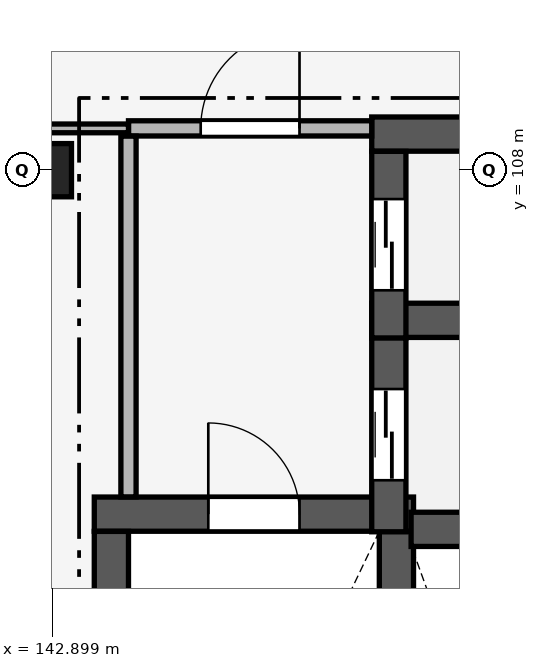
"""IFC4 building model, lengths in metres.
Left out: names, types, materials, properties, quantities, classifications, styles, units other than length and angle.
Written with IfcOpenShell. Run it as: python <this file> out.ifc"""

import sys

from ifc_helpers import new_model, si_unit, direction, frame, frame_2d, origin, origin_2d, place, context, subcontext, project, spatial, rectangle, extrude, element, fill, save


model = new_model("IFC4")
c1 = context("Model", 3, precision=1e-05, world=origin(), true_north=direction((0.0, 1.0)))
c2 = subcontext(c1, "Body", "Model", "MODEL_VIEW")
j1 = project(units=[si_unit("LENGTHUNIT", "METRE"), si_unit("PLANEANGLEUNIT", "RADIAN")], contexts=[c1])
p1 = place(None, origin())
s1 = spatial("IfcSite", under=j1, at=p1, CompositionType="ELEMENT")
p2 = place(p1, origin())
s2 = spatial("IfcBuilding", under=s1, at=p2, CompositionType="ELEMENT")
p3 = place(p2, frame((0.0, 0.0, 29.4)))
s3 = spatial("IfcBuildingStorey", under=s2, at=p3, CompositionType="ELEMENT", Elevation=29.4)
p4 = place(p3, frame((142.8, 108.0, 0.0), z_axis=(0.0, 0.0, 1.0), x_axis=(1.0, 0.0, 0.0)))
e1 = element("IfcColumn", 1, at=p4, inside=s3, PredefinedType="COLUMN", context=c2, shape_type="SweptSolid", body=[
    extrude(rectangle(XDim=0.7, YDim=0.7, at=origin_2d()), origin(), (0.0, 0.0, 1.0), 4.2),
])
p5 = place(p3, frame((143.45, 103.475, 0.0), z_axis=(0.0, 0.0, 1.0), x_axis=(1.0, 0.0, 0.0)))
e2 = element("IfcWall", 2, at=p5, inside=s3, PredefinedType="SHEAR", context=c2, shape_type="SweptSolid", body=[
    extrude(rectangle(XDim=4.2, YDim=0.45, at=frame_2d((2.1, 0.0))), origin(), (0.0, 0.0, 1.0), 3.95),
])
p6 = place(p5, frame((1.5, 0.0, 0.0)))
e3 = element("IfcOpeningElement", 3, at=p6, cuts=e2, PredefinedType="OPENING", context=c2, shape_type="SweptSolid", body=[
    extrude(rectangle(XDim=1.2, YDim=2.2, at=frame_2d((0.6, 1.1))), frame((0.0, 0.24, 0.0), z_axis=(0.0, -1.0, 0.0), x_axis=(1.0, 0.0, 0.0)), (0.0, 0.0, 1.0), 0.48),
])
for number, where, z_axis, x_axis in (
    (4, (143.675, 96.352, 0.0), (0.0, 0.0, 1.0), (0.0, 1.0, 0.0)),
    (5, (147.425, 96.352, 0.0), (0.0, 0.0, 1.0), (0.0, 1.0, 0.0)),
):
    element("IfcWall", number, at=place(p3, frame(where, z_axis=z_axis, x_axis=x_axis)), inside=s3, PredefinedType="SHEAR", context=c2, shape_type="SweptSolid", body=[
        extrude(rectangle(XDim=6.896, YDim=0.45, at=frame_2d((3.448, 0.0))), origin(), (0.0, 0.0, 1.0), 3.95),
    ])
p7 = place(p3, frame((147.618, 103.275, 0.0), z_axis=(0.0, 0.0, 1.0), x_axis=(1.0, 0.0, 0.0)))
e6 = element("IfcWall", 6, at=p7, inside=s3, PredefinedType="SHEAR", context=c2, shape_type="SweptSolid", body=[
    extrude(rectangle(XDim=2.882, YDim=0.45, at=frame_2d((1.441, 0.0))), origin(), (0.0, 0.0, 1.0), 3.95),
])
p8 = place(p3, frame((147.1, 106.025, 0.0), z_axis=(0.0, 0.0, 1.0), x_axis=(1.0, 0.0, 0.0)))
e7 = element("IfcWall", 7, at=p8, inside=s3, PredefinedType="SHEAR", context=c2, shape_type="SweptSolid", body=[
    extrude(rectangle(XDim=3.4, YDim=0.45, at=frame_2d((1.7, 0.0))), origin(), (0.0, 0.0, 1.0), 3.95),
])
p9 = place(p3, frame((147.325, 103.243, 0.0), z_axis=(0.0, 0.0, 1.0), x_axis=(0.0, 1.0, 0.0)))
e8 = element("IfcWall", 8, at=p9, inside=s3, PredefinedType="SHEAR", context=c2, shape_type="SweptSolid", body=[
    extrude(rectangle(XDim=2.555, YDim=0.45, at=frame_2d((1.278, 0.0))), origin(), (0.0, 0.0, 1.0), 3.95),
])
p10 = place(p9, frame((0.678, 0.0, 0.0)))
e9 = element("IfcOpeningElement", 9, at=p10, cuts=e8, PredefinedType="OPENING", context=c2, shape_type="SweptSolid", body=[
    extrude(rectangle(XDim=1.2, YDim=2.15, at=frame_2d((0.6, 1.075))), frame((0.0, 0.24, 0.0), z_axis=(0.0, -1.0, 0.0), x_axis=(1.0, 0.0, 0.0)), (0.0, 0.0, 1.0), 0.48),
])
p11 = place(p3, frame((147.1, 108.475, 0.0), z_axis=(0.0, 0.0, 1.0), x_axis=(1.0, 0.0, 0.0)))
e10 = element("IfcWall", 10, at=p11, inside=s3, PredefinedType="SHEAR", context=c2, shape_type="SweptSolid", body=[
    extrude(rectangle(XDim=3.777, YDim=0.45, at=frame_2d((1.888, 0.0))), origin(), (0.0, 0.0, 1.0), 3.95),
])
p12 = place(p3, frame((147.325, 105.793, 0.0), z_axis=(0.0, 0.0, 1.0), x_axis=(0.0, 1.0, 0.0)))
e11 = element("IfcWall", 11, at=p12, inside=s3, PredefinedType="SHEAR", context=c2, shape_type="SweptSolid", body=[
    extrude(rectangle(XDim=2.455, YDim=0.45, at=frame_2d((1.228, 0.0))), origin(), (0.0, 0.0, 1.0), 3.95),
])
p13 = place(p12, frame((0.627, 0.0, 0.0)))
e12 = element("IfcOpeningElement", 12, at=p13, cuts=e11, PredefinedType="OPENING", context=c2, shape_type="SweptSolid", body=[
    extrude(rectangle(XDim=1.2, YDim=2.15, at=frame_2d((0.6, 1.075))), frame((0.0, 0.24, 0.0), z_axis=(0.0, -1.0, 0.0), x_axis=(1.0, 0.0, 0.0)), (0.0, 0.0, 1.0), 0.48),
])
p14 = place(p3, frame((143.9, 108.55, 0.0), z_axis=(0.0, 0.0, 1.0), x_axis=(1.0, 0.0, 0.0)))
e13 = element("IfcWall", 13, at=p14, inside=s3, PredefinedType="PARTITIONING", context=c2, shape_type="SweptSolid", body=[
    extrude(rectangle(XDim=3.2, YDim=0.2, at=frame_2d((1.6, 0.0))), origin(), (0.0, 0.0, 1.0), 3.95),
])
p15 = place(p14, frame((0.95, 0.0, 0.0)))
e14 = element("IfcOpeningElement", 14, at=p15, cuts=e13, PredefinedType="OPENING", context=c2, shape_type="SweptSolid", body=[
    extrude(rectangle(XDim=1.3, YDim=2.2, at=frame_2d((0.65, 1.1))), frame((0.0, 0.115, 0.0), z_axis=(0.0, -1.0, 0.0), x_axis=(1.0, 0.0, 0.0)), (0.0, 0.0, 1.0), 0.23),
])
p16 = place(p3, frame((142.455, 108.55, 0.0), z_axis=(0.0, 0.0, 1.0), x_axis=(1.0, 0.0, 0.0)))
e15 = element("IfcWall", 15, at=p16, inside=s3, PredefinedType="PARTITIONING", context=c2, shape_type="SweptSolid", body=[
    extrude(rectangle(XDim=1.445, YDim=0.115, at=frame_2d((0.722, 0.0))), origin(), (0.0, 0.0, 1.0), 3.4),
])
p17 = place(p3, frame((143.9, 103.702, 0.0), z_axis=(0.0, 0.0, 1.0), x_axis=(0.0, 1.0, 0.0)))
e16 = element("IfcWall", 16, at=p17, inside=s3, PredefinedType="PARTITIONING", context=c2, shape_type="SweptSolid", body=[
    extrude(rectangle(XDim=4.746, YDim=0.2, at=frame_2d((2.373, 0.0))), origin(), (0.0, 0.0, 1.0), 3.95),
])
p18 = place(p6, origin())
e17 = element("IfcDoor", 17, at=p18, inside=s3, OperationType="SINGLE_SWING_LEFT", PredefinedType="DOOR", context=c2, shape_type="SweptSolid", body=[
    extrude(rectangle(XDim=1.2, YDim=2.2, at=frame_2d((0.6, 1.1))), frame((0.0, 0.025, 0.0), z_axis=(0.0, -1.0, 0.0), x_axis=(1.0, 0.0, 0.0)), (0.0, 0.0, 1.0), 0.05),
])
fill(e3, e17)
p19 = place(p10, origin())
e18 = element("IfcDoor", 18, at=p19, inside=s3, OperationType="DOUBLE_DOOR_SLIDING", PredefinedType="DOOR", context=c2, shape_type="SweptSolid", body=[
    extrude(rectangle(XDim=1.2, YDim=2.15, at=frame_2d((0.6, 1.075))), frame((0.0, 0.025, 0.0), z_axis=(0.0, -1.0, 0.0), x_axis=(1.0, 0.0, 0.0)), (0.0, 0.0, 1.0), 0.05),
])
fill(e9, e18)
p20 = place(p13, origin())
e19 = element("IfcDoor", 19, at=p20, inside=s3, OperationType="DOUBLE_DOOR_SLIDING", PredefinedType="DOOR", context=c2, shape_type="SweptSolid", body=[
    extrude(rectangle(XDim=1.2, YDim=2.15, at=frame_2d((0.6, 1.075))), frame((0.0, 0.025, 0.0), z_axis=(0.0, -1.0, 0.0), x_axis=(1.0, 0.0, 0.0)), (0.0, 0.0, 1.0), 0.05),
])
fill(e12, e19)
p21 = place(p15, origin())
e20 = element("IfcDoor", 20, at=p21, inside=s3, OperationType="SINGLE_SWING_RIGHT", PredefinedType="DOOR", context=c2, shape_type="SweptSolid", body=[
    extrude(rectangle(XDim=1.3, YDim=2.2, at=frame_2d((0.65, 1.1))), frame((0.0, 0.025, 0.0), z_axis=(0.0, -1.0, 0.0), x_axis=(1.0, 0.0, 0.0)), (0.0, 0.0, 1.0), 0.05),
])
fill(e14, e20)
save(model, sys.argv[1])
